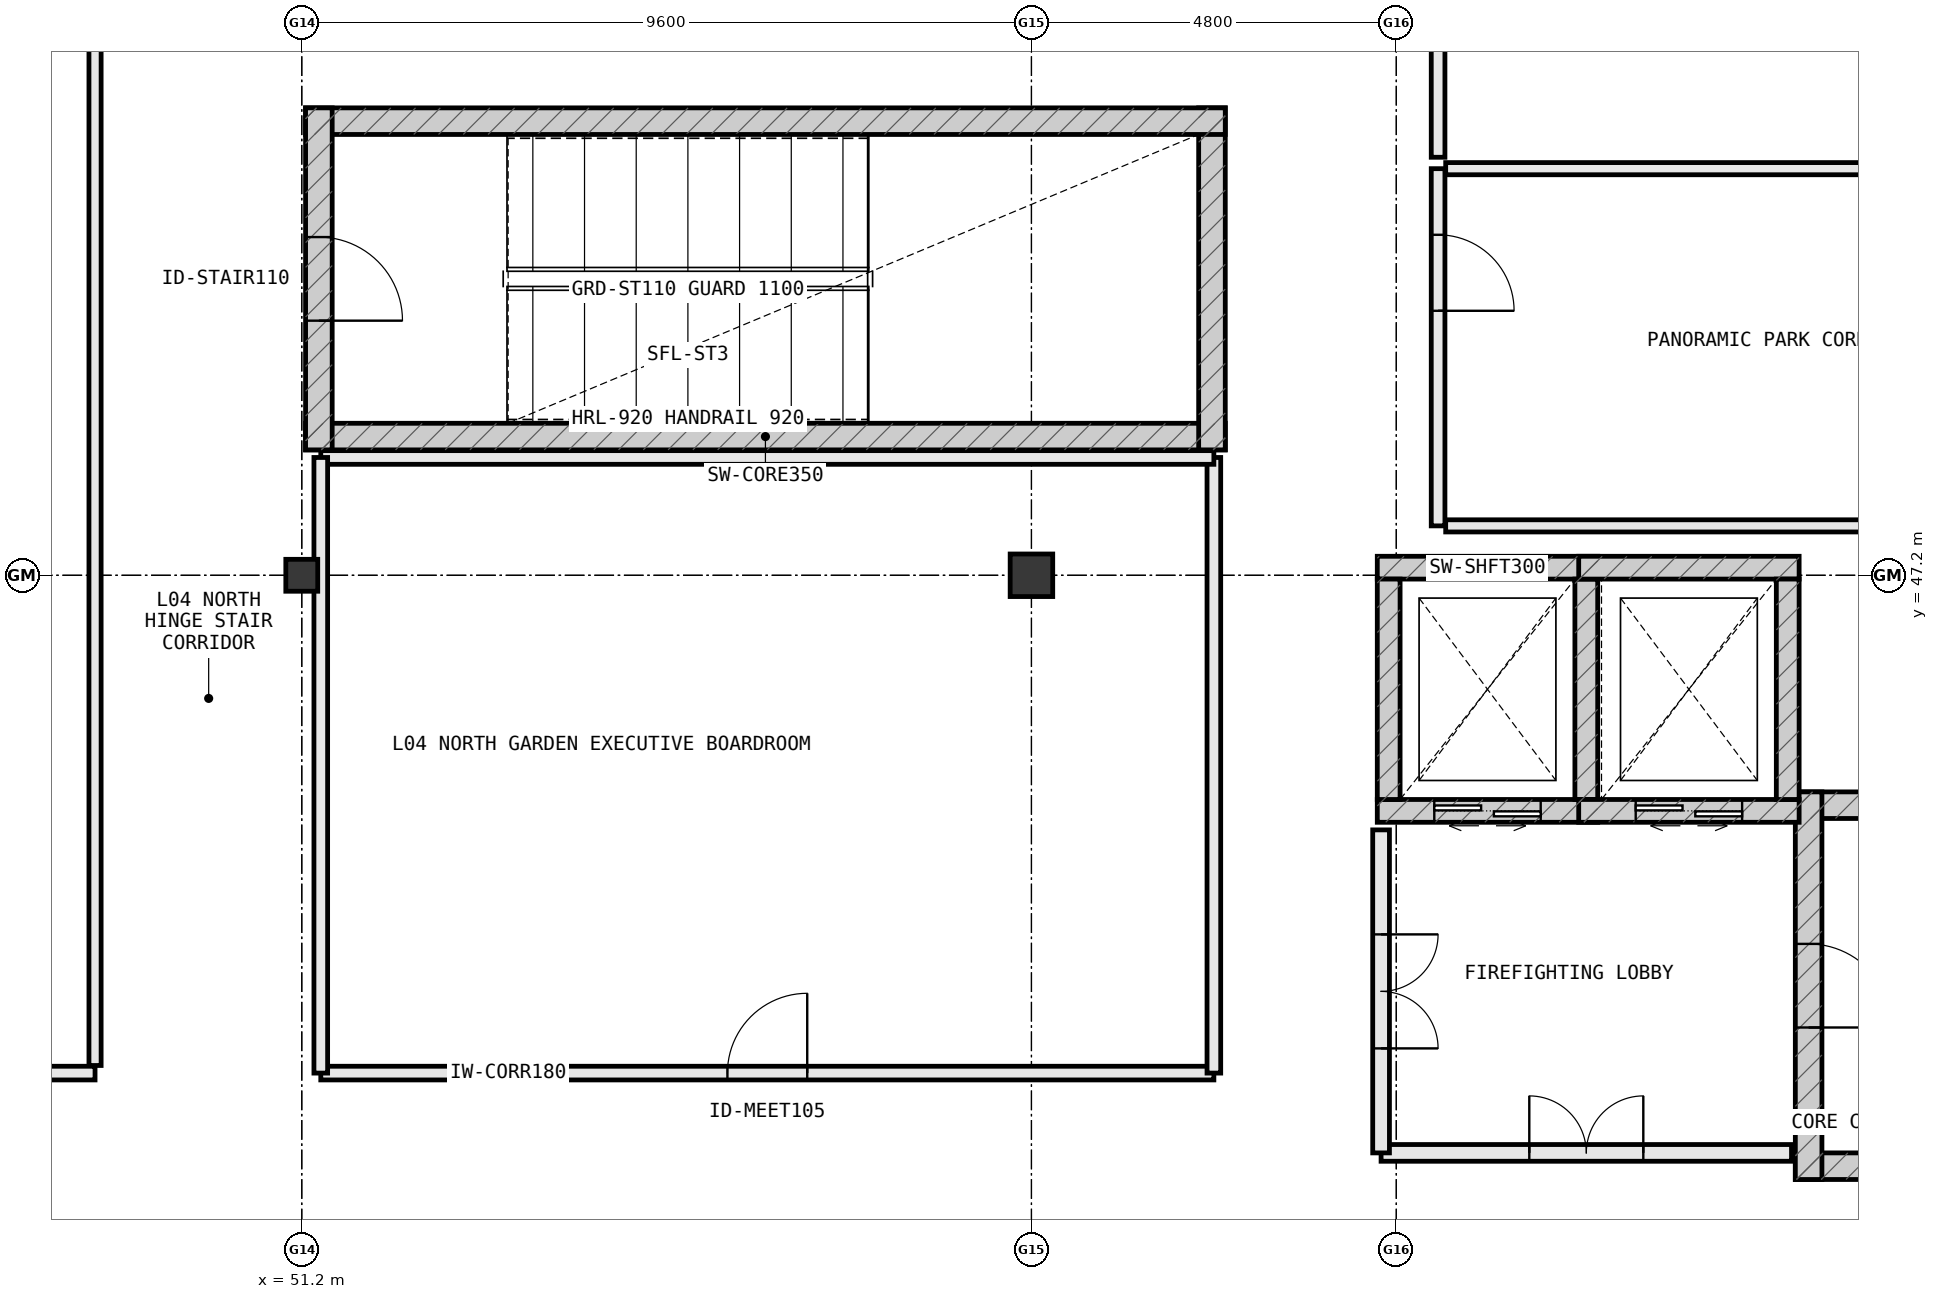
"""IFC4 building model, lengths in metres.
Left out: names, types, materials, properties, quantities, classifications, styles, units other than length and angle.
Written with IfcOpenShell. Run it as: python <this file> out.ifc"""

import sys

from ifc_helpers import new_model, si_unit, direction, frame, frame_2d, origin, origin_2d, place, context, subcontext, project, spatial, rectangle, extrude, element, fill, save


model = new_model("IFC4")
c1 = context("Model", 3, precision=1e-05, world=origin(), true_north=direction((0.0, 1.0)))
c2 = subcontext(c1, "Body", "Model", "MODEL_VIEW")
j1 = project(units=[si_unit("LENGTHUNIT", "METRE"), si_unit("PLANEANGLEUNIT", "RADIAN")], contexts=[c1])
p1 = place(None, origin())
s1 = spatial("IfcSite", under=j1, at=p1, CompositionType="ELEMENT")
p2 = place(p1, origin())
s2 = spatial("IfcBuilding", under=s1, at=p2, CompositionType="ELEMENT")
p3 = place(p2, frame((0.0, 0.0, 20.0)))
s3 = spatial("IfcBuildingStorey", under=s2, at=p3, CompositionType="ELEMENT", Elevation=20.0)
p4 = place(p3, frame((60.8, 47.2, 0.0), z_axis=(0.0, 0.0, 1.0), x_axis=(1.0, 0.0, 0.0)))
e1 = element("IfcColumn", 1, at=p4, inside=s3, PredefinedType="COLUMN", context=c2, shape_type="SweptSolid", body=[
    extrude(rectangle(XDim=0.56, YDim=0.56, at=origin_2d()), origin(), (0.0, 0.0, 1.0), 3.8),
])
p5 = place(p3, frame((51.2, 47.2, 0.0), z_axis=(0.0, 0.0, 1.0), x_axis=(1.0, 0.0, 0.0)))
e2 = element("IfcColumn", 2, at=p5, inside=s3, PredefinedType="COLUMN", context=c2, shape_type="SweptSolid", body=[
    extrude(rectangle(XDim=0.42, YDim=0.42, at=origin_2d()), origin(), (0.0, 0.0, 1.0), 3.8),
])
for number, where, z_axis, x_axis in (
    (3, (70.85, 39.425, 0.0), (0.0, 0.0, 1.0), (1.0, 0.0, 0.0)),
    (4, (82.95, 44.175, 0.0), (0.0, 0.0, 1.0), (-1.0, 0.0, 0.0)),
):
    element("IfcWall", number, at=place(p3, frame(where, z_axis=z_axis, x_axis=x_axis)), inside=s3, PredefinedType="SHEAR", context=c2, shape_type="SweptSolid", body=[
        extrude(rectangle(XDim=12.1, YDim=0.35, at=frame_2d((6.05, 0.0))), origin(), (0.0, 0.0, 1.0), 3.8),
    ])
p6 = place(p3, frame((71.025, 44.35, 0.0), z_axis=(0.0, 0.0, 1.0), x_axis=(0.0, -1.0, 0.0)))
e5 = element("IfcWall", 5, at=p6, inside=s3, PredefinedType="SHEAR", context=c2, shape_type="SweptSolid", body=[
    extrude(rectangle(XDim=5.1, YDim=0.35, at=frame_2d((2.55, 0.0))), origin(), (0.0, 0.0, 1.0), 3.8),
])
p7 = place(p6, frame((2.0, 0.0, 0.0)))
e6 = element("IfcOpeningElement", 6, at=p7, cuts=e5, PredefinedType="OPENING", context=c2, shape_type="SweptSolid", body=[
    extrude(rectangle(XDim=1.1, YDim=2.2, at=frame_2d((0.55, 1.1))), frame((0.0, 0.187, 0.0), z_axis=(0.0, -1.0, 0.0), x_axis=(1.0, 0.0, 0.0)), (0.0, 0.0, 1.0), 0.374),
])
p8 = place(p3, frame((51.25, 49.025, 0.0), z_axis=(0.0, 0.0, 1.0), x_axis=(1.0, 0.0, 0.0)))
e7 = element("IfcWall", 7, at=p8, inside=s3, PredefinedType="SHEAR", context=c2, shape_type="SweptSolid", body=[
    extrude(rectangle(XDim=12.1, YDim=0.35, at=frame_2d((6.05, 0.0))), origin(), (0.0, 0.0, 1.0), 3.8),
])
p9 = place(p3, frame((63.175, 48.85, 0.0), z_axis=(0.0, 0.0, 1.0), x_axis=(0.0, 1.0, 0.0)))
e8 = element("IfcWall", 8, at=p9, inside=s3, PredefinedType="SHEAR", context=c2, shape_type="SweptSolid", body=[
    extrude(rectangle(XDim=4.5, YDim=0.35, at=frame_2d((2.25, 0.0))), origin(), (0.0, 0.0, 1.0), 3.8),
])
p10 = place(p3, frame((63.35, 53.175, 0.0), z_axis=(0.0, 0.0, 1.0), x_axis=(-1.0, 0.0, 0.0)))
e9 = element("IfcWall", 9, at=p10, inside=s3, PredefinedType="SHEAR", context=c2, shape_type="SweptSolid", body=[
    extrude(rectangle(XDim=12.1, YDim=0.35, at=frame_2d((6.05, 0.0))), origin(), (0.0, 0.0, 1.0), 3.8),
])
p11 = place(p3, frame((51.425, 53.35, 0.0), z_axis=(0.0, 0.0, 1.0), x_axis=(0.0, -1.0, 0.0)))
e10 = element("IfcWall", 10, at=p11, inside=s3, PredefinedType="SHEAR", context=c2, shape_type="SweptSolid", body=[
    extrude(rectangle(XDim=4.5, YDim=0.35, at=frame_2d((2.25, 0.0))), origin(), (0.0, 0.0, 1.0), 3.8),
])
p12 = place(p11, frame((1.7, 0.0, 0.0)))
e11 = element("IfcOpeningElement", 11, at=p12, cuts=e10, PredefinedType="OPENING", context=c2, shape_type="SweptSolid", body=[
    extrude(rectangle(XDim=1.1, YDim=2.2, at=frame_2d((0.55, 1.1))), frame((0.0, 0.187, 0.0), z_axis=(0.0, -1.0, 0.0), x_axis=(1.0, 0.0, 0.0)), (0.0, 0.0, 1.0), 0.374),
])
p13 = place(p3, frame((65.35, 44.1, 0.0), z_axis=(0.0, 0.0, 1.0), x_axis=(1.0, 0.0, 0.0)))
e12 = element("IfcWall", 12, at=p13, inside=s3, PredefinedType="SHEAR", context=c2, shape_type="SweptSolid", body=[
    extrude(rectangle(XDim=2.9, YDim=0.3, at=frame_2d((1.45, 0.0))), origin(), (0.0, 0.0, 1.0), 3.8),
])
p14 = place(p13, frame((0.75, 0.0, 0.0)))
e13 = element("IfcOpeningElement", 13, at=p14, cuts=e12, PredefinedType="OPENING", context=c2, shape_type="SweptSolid", body=[
    extrude(rectangle(XDim=1.4, YDim=2.2, at=frame_2d((0.7, 1.1))), frame((0.0, 0.162, 0.0), z_axis=(0.0, -1.0, 0.0), x_axis=(1.0, 0.0, 0.0)), (0.0, 0.0, 1.0), 0.324),
])
for number, where, z_axis, x_axis in (
    (14, (68.25, 47.3, 0.0), (0.0, 0.0, 1.0), (-1.0, 0.0, 0.0)),
    (15, (68.1, 44.25, 0.0), (0.0, 0.0, 1.0), (0.0, 1.0, 0.0)),
    (16, (65.5, 47.15, 0.0), (0.0, 0.0, 1.0), (0.0, -1.0, 0.0)),
):
    element("IfcWall", number, at=place(p3, frame(where, z_axis=z_axis, x_axis=x_axis)), inside=s3, PredefinedType="SHEAR", context=c2, shape_type="SweptSolid", body=[
        extrude(rectangle(XDim=2.9, YDim=0.3, at=frame_2d((1.45, 0.0))), origin(), (0.0, 0.0, 1.0), 3.8),
    ])
p15 = place(p3, frame((68.0, 44.1, 0.0), z_axis=(0.0, 0.0, 1.0), x_axis=(1.0, 0.0, 0.0)))
e17 = element("IfcWall", 17, at=p15, inside=s3, PredefinedType="SHEAR", context=c2, shape_type="SweptSolid", body=[
    extrude(rectangle(XDim=2.9, YDim=0.3, at=frame_2d((1.45, 0.0))), origin(), (0.0, 0.0, 1.0), 3.8),
])
p16 = place(p15, frame((0.75, 0.0, 0.0)))
e18 = element("IfcOpeningElement", 18, at=p16, cuts=e17, PredefinedType="OPENING", context=c2, shape_type="SweptSolid", body=[
    extrude(rectangle(XDim=1.4, YDim=2.2, at=frame_2d((0.7, 1.1))), frame((0.0, 0.162, 0.0), z_axis=(0.0, -1.0, 0.0), x_axis=(1.0, 0.0, 0.0)), (0.0, 0.0, 1.0), 0.324),
])
for number, where, z_axis, x_axis in (
    (19, (70.9, 47.3, 0.0), (0.0, 0.0, 1.0), (-1.0, 0.0, 0.0)),
    (20, (70.75, 44.25, 0.0), (0.0, 0.0, 1.0), (0.0, 1.0, 0.0)),
):
    element("IfcWall", number, at=place(p3, frame(where, z_axis=z_axis, x_axis=x_axis)), inside=s3, PredefinedType="SHEAR", context=c2, shape_type="SweptSolid", body=[
        extrude(rectangle(XDim=2.9, YDim=0.3, at=frame_2d((1.45, 0.0))), origin(), (0.0, 0.0, 1.0), 3.8),
    ])
p17 = place(p3, frame((65.4, 39.6, 0.0), z_axis=(0.0, 0.0, 1.0), x_axis=(1.0, 0.0, 0.0)))
e21 = element("IfcWall", 21, at=p17, inside=s3, PredefinedType="STANDARD", context=c2, shape_type="SweptSolid", body=[
    extrude(rectangle(XDim=5.4, YDim=0.22, at=frame_2d((2.7, 0.0))), origin(), (0.0, 0.0, 1.0), 3.55),
])
p18 = place(p17, frame((1.95, 0.0, 0.0)))
e22 = element("IfcOpeningElement", 22, at=p18, cuts=e21, PredefinedType="OPENING", context=c2, shape_type="SweptSolid", body=[
    extrude(rectangle(XDim=1.5, YDim=2.2, at=frame_2d((0.75, 1.1))), frame((0.0, 0.122, 0.0), z_axis=(0.0, -1.0, 0.0), x_axis=(1.0, 0.0, 0.0)), (0.0, 0.0, 1.0), 0.244),
])
p19 = place(p3, frame((65.4, 43.85, 0.0), z_axis=(0.0, 0.0, 1.0), x_axis=(0.0, -1.0, 0.0)))
e23 = element("IfcWall", 23, at=p19, inside=s3, PredefinedType="STANDARD", context=c2, shape_type="SweptSolid", body=[
    extrude(rectangle(XDim=4.25, YDim=0.22, at=frame_2d((2.125, 0.0))), origin(), (0.0, 0.0, 1.0), 3.55),
])
p20 = place(p19, frame((1.375, 0.0, 0.0)))
e24 = element("IfcOpeningElement", 24, at=p20, cuts=e23, PredefinedType="OPENING", context=c2, shape_type="SweptSolid", body=[
    extrude(rectangle(XDim=1.5, YDim=2.2, at=frame_2d((0.75, 1.1))), frame((0.0, 0.122, 0.0), z_axis=(0.0, -1.0, 0.0), x_axis=(1.0, 0.0, 0.0)), (0.0, 0.0, 1.0), 0.244),
])
p21 = place(p3, frame((51.45, 40.65, 0.0), z_axis=(0.0, 0.0, 1.0), x_axis=(1.0, 0.0, 0.0)))
e25 = element("IfcWall", 25, at=p21, inside=s3, PredefinedType="PARTITIONING", context=c2, shape_type="SweptSolid", body=[
    extrude(rectangle(XDim=11.75, YDim=0.18, at=frame_2d((5.875, 0.0))), origin(), (0.0, 0.0, 1.0), 3.55),
])
p22 = place(p21, frame((5.35, 0.0, 0.0)))
e26 = element("IfcOpeningElement", 26, at=p22, cuts=e25, PredefinedType="OPENING", context=c2, shape_type="SweptSolid", body=[
    extrude(rectangle(XDim=1.05, YDim=2.2, at=frame_2d((0.525, 1.1))), frame((0.0, 0.102, 0.0), z_axis=(0.0, -1.0, 0.0), x_axis=(1.0, 0.0, 0.0)), (0.0, 0.0, 1.0), 0.204),
])
p23 = place(p3, frame((63.2, 40.65, 0.0), z_axis=(0.0, 0.0, 1.0), x_axis=(0.0, 1.0, 0.0)))
e27 = element("IfcWall", 27, at=p23, inside=s3, PredefinedType="PARTITIONING", context=c2, shape_type="SweptSolid", body=[
    extrude(rectangle(XDim=8.1, YDim=0.18, at=frame_2d((4.05, 0.0))), origin(), (0.0, 0.0, 1.0), 3.55),
])
p24 = place(p3, frame((63.2, 48.75, 0.0), z_axis=(0.0, 0.0, 1.0), x_axis=(-1.0, 0.0, 0.0)))
e28 = element("IfcWall", 28, at=p24, inside=s3, PredefinedType="PARTITIONING", context=c2, shape_type="SweptSolid", body=[
    extrude(rectangle(XDim=11.75, YDim=0.18, at=frame_2d((5.875, 0.0))), origin(), (0.0, 0.0, 1.0), 3.55),
])
p25 = place(p3, frame((51.45, 48.75, 0.0), z_axis=(0.0, 0.0, 1.0), x_axis=(0.0, -1.0, 0.0)))
e29 = element("IfcWall", 29, at=p25, inside=s3, PredefinedType="PARTITIONING", context=c2, shape_type="SweptSolid", body=[
    extrude(rectangle(XDim=8.1, YDim=0.18, at=frame_2d((4.05, 0.0))), origin(), (0.0, 0.0, 1.0), 2.905),
])
p26 = place(p3, frame((66.15, 52.55, 0.0), z_axis=(0.0, 0.0, 1.0), x_axis=(0.0, -1.0, 0.0)))
e30 = element("IfcWall", 30, at=p26, inside=s3, PredefinedType="PARTITIONING", context=c2, shape_type="SweptSolid", body=[
    extrude(rectangle(XDim=4.7, YDim=0.18, at=frame_2d((2.35, 0.0))), origin(), (0.0, 0.0, 1.0), 3.55),
])
p27 = place(p26, frame((0.87, 0.0, 0.0)))
e31 = element("IfcOpeningElement", 31, at=p27, cuts=e30, PredefinedType="OPENING", context=c2, shape_type="SweptSolid", body=[
    extrude(rectangle(XDim=1.0, YDim=2.2, at=frame_2d((0.5, 1.1))), frame((0.0, 0.102, 0.0), z_axis=(0.0, -1.0, 0.0), x_axis=(1.0, 0.0, 0.0)), (0.0, 0.0, 1.0), 0.204),
])
for number, where, z_axis, x_axis in (
    (32, (66.25, 47.85, 0.0), (0.0, 0.0, 1.0), (1.0, 0.0, 0.0)),
    (33, (66.25, 52.55, 0.0), (0.0, 0.0, 1.0), (1.0, 0.0, 0.0)),
):
    element("IfcWall", number, at=place(p3, frame(where, z_axis=z_axis, x_axis=x_axis)), inside=s3, PredefinedType="PARTITIONING", context=c2, shape_type="SweptSolid", body=[
        extrude(rectangle(XDim=17.59, YDim=0.16, at=frame_2d((8.795, 0.0))), origin(), (0.0, 0.0, 1.0), 3.55),
    ])
p28 = place(p3, frame((66.15, 57.65, 0.0), z_axis=(0.0, 0.0, 1.0), x_axis=(0.0, -1.0, 0.0)))
e34 = element("IfcWall", 34, at=p28, inside=s3, PredefinedType="PARTITIONING", context=c2, shape_type="SweptSolid", body=[
    extrude(rectangle(XDim=4.95, YDim=0.18, at=frame_2d((2.475, 0.0))), origin(), (0.0, 0.0, 1.0), 3.55),
])
p29 = place(p28, frame((1.975, 0.0, 0.0)))
e35 = element("IfcOpeningElement", 35, at=p29, cuts=e34, PredefinedType="OPENING", context=c2, shape_type="SweptSolid", body=[
    extrude(rectangle(XDim=1.0, YDim=2.2, at=frame_2d((0.5, 1.1))), frame((0.0, 0.102, 0.0), z_axis=(0.0, -1.0, 0.0), x_axis=(1.0, 0.0, 0.0)), (0.0, 0.0, 1.0), 0.204),
])
p30 = place(p3, frame((41.95, 40.65, 0.0), z_axis=(0.0, 0.0, 1.0), x_axis=(1.0, 0.0, 0.0)))
e36 = element("IfcWall", 36, at=p30, inside=s3, PredefinedType="PARTITIONING", context=c2, shape_type="SweptSolid", body=[
    extrude(rectangle(XDim=6.53, YDim=0.18, at=frame_2d((3.265, 0.0))), origin(), (0.0, 0.0, 1.0), 3.55),
])
p31 = place(p30, frame((3.745, 0.0, 0.0)))
e37 = element("IfcOpeningElement", 37, at=p31, cuts=e36, PredefinedType="OPENING", context=c2, shape_type="SweptSolid", body=[
    extrude(rectangle(XDim=1.0, YDim=2.2, at=frame_2d((0.5, 1.1))), frame((0.0, 0.102, 0.0), z_axis=(0.0, -1.0, 0.0), x_axis=(1.0, 0.0, 0.0)), (0.0, 0.0, 1.0), 0.204),
])
p32 = place(p3, frame((48.48, 40.75, 0.0), z_axis=(0.0, 0.0, 1.0), x_axis=(0.0, 1.0, 0.0)))
e38 = element("IfcWall", 38, at=p32, inside=s3, PredefinedType="PARTITIONING", context=c2, shape_type="SweptSolid", body=[
    extrude(rectangle(XDim=17.09, YDim=0.16, at=frame_2d((8.545, 0.0))), origin(), (0.0, 0.0, 1.0), 3.05),
])
p33 = place(p7, origin())
e39 = element("IfcDoor", 39, at=p33, inside=s3, OperationType="SINGLE_SWING_RIGHT", PredefinedType="DOOR", context=c2, shape_type="SweptSolid", body=[
    extrude(rectangle(XDim=1.1, YDim=2.2, at=frame_2d((0.55, 1.1))), frame((0.0, 0.025, 0.0), z_axis=(0.0, -1.0, 0.0), x_axis=(1.0, 0.0, 0.0)), (0.0, 0.0, 1.0), 0.05),
])
fill(e6, e39)
p34 = place(p12, origin())
e40 = element("IfcDoor", 40, at=p34, inside=s3, OperationType="SINGLE_SWING_RIGHT", PredefinedType="DOOR", context=c2, shape_type="SweptSolid", body=[
    extrude(rectangle(XDim=1.1, YDim=2.2, at=frame_2d((0.55, 1.1))), frame((0.0, 0.025, 0.0), z_axis=(0.0, -1.0, 0.0), x_axis=(1.0, 0.0, 0.0)), (0.0, 0.0, 1.0), 0.05),
])
fill(e11, e40)
p35 = place(p14, origin())
e41 = element("IfcDoor", 41, at=p35, inside=s3, OperationType="DOUBLE_DOOR_SLIDING", PredefinedType="DOOR", context=c2, shape_type="SweptSolid", body=[
    extrude(rectangle(XDim=1.4, YDim=2.2, at=frame_2d((0.7, 1.1))), frame((0.0, 0.025, 0.0), z_axis=(0.0, -1.0, 0.0), x_axis=(1.0, 0.0, 0.0)), (0.0, 0.0, 1.0), 0.05),
])
fill(e13, e41)
p36 = place(p16, origin())
e42 = element("IfcDoor", 42, at=p36, inside=s3, OperationType="DOUBLE_DOOR_SLIDING", PredefinedType="DOOR", context=c2, shape_type="SweptSolid", body=[
    extrude(rectangle(XDim=1.4, YDim=2.2, at=frame_2d((0.7, 1.1))), frame((0.0, 0.025, 0.0), z_axis=(0.0, -1.0, 0.0), x_axis=(1.0, 0.0, 0.0)), (0.0, 0.0, 1.0), 0.05),
])
fill(e18, e42)
p37 = place(p18, origin())
e43 = element("IfcDoor", 43, at=p37, inside=s3, OperationType="DOUBLE_DOOR_SINGLE_SWING", PredefinedType="DOOR", context=c2, shape_type="SweptSolid", body=[
    extrude(rectangle(XDim=1.5, YDim=2.2, at=frame_2d((0.75, 1.1))), frame((0.0, 0.025, 0.0), z_axis=(0.0, -1.0, 0.0), x_axis=(1.0, 0.0, 0.0)), (0.0, 0.0, 1.0), 0.05),
])
fill(e22, e43)
p38 = place(p20, origin())
e44 = element("IfcDoor", 44, at=p38, inside=s3, OperationType="DOUBLE_DOOR_SINGLE_SWING", PredefinedType="DOOR", context=c2, shape_type="SweptSolid", body=[
    extrude(rectangle(XDim=1.5, YDim=2.2, at=frame_2d((0.75, 1.1))), frame((0.0, 0.025, 0.0), z_axis=(0.0, -1.0, 0.0), x_axis=(1.0, 0.0, 0.0)), (0.0, 0.0, 1.0), 0.05),
])
fill(e24, e44)
p39 = place(p22, origin())
e45 = element("IfcDoor", 45, at=p39, inside=s3, OperationType="SINGLE_SWING_RIGHT", PredefinedType="DOOR", context=c2, shape_type="SweptSolid", body=[
    extrude(rectangle(XDim=1.05, YDim=2.2, at=frame_2d((0.525, 1.1))), frame((0.0, 0.025, 0.0), z_axis=(0.0, -1.0, 0.0), x_axis=(1.0, 0.0, 0.0)), (0.0, 0.0, 1.0), 0.05),
])
fill(e26, e45)
p40 = place(p27, origin())
e46 = element("IfcDoor", 46, at=p40, inside=s3, OperationType="SINGLE_SWING_RIGHT", PredefinedType="DOOR", context=c2, shape_type="SweptSolid", body=[
    extrude(rectangle(XDim=1.0, YDim=2.2, at=frame_2d((0.5, 1.1))), frame((0.0, 0.025, 0.0), z_axis=(0.0, -1.0, 0.0), x_axis=(1.0, 0.0, 0.0)), (0.0, 0.0, 1.0), 0.05),
])
fill(e31, e46)
save(model, sys.argv[1])
